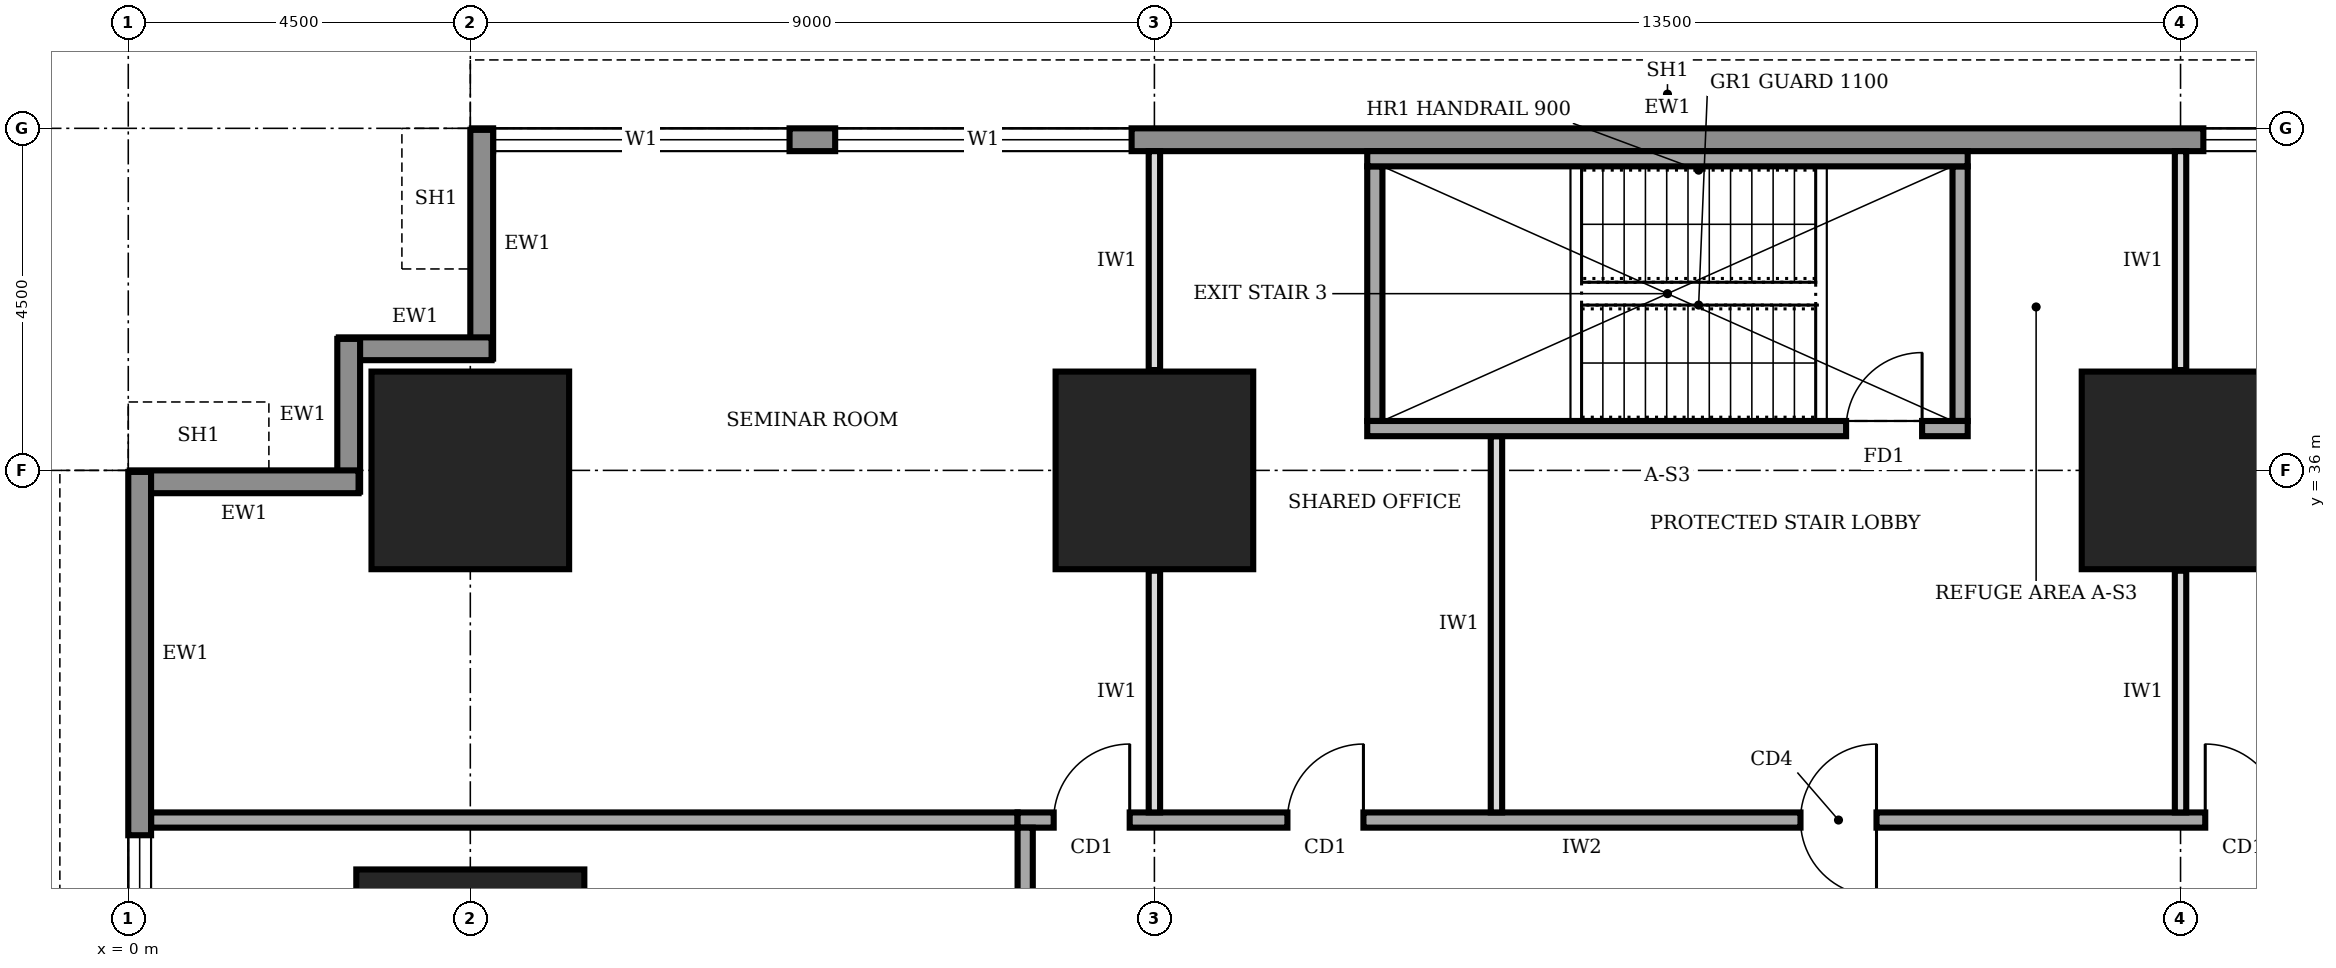
"""IFC4 building model, lengths in metres.
Left out: names, types, materials, properties, quantities, classifications, styles, units other than length and angle.
Written with IfcOpenShell. Run it as: python <this file> out.ifc"""

import sys

from ifc_helpers import new_model, si_unit, direction, frame, frame_2d, origin, origin_2d, place, context, subcontext, project, spatial, rectangle, extrude, element, fill, save


model = new_model("IFC4")
c1 = context("Model", 3, precision=1e-05, world=origin(), true_north=direction((0.0, 1.0)))
c2 = subcontext(c1, "Body", "Model", "MODEL_VIEW")
j1 = project(units=[si_unit("LENGTHUNIT", "METRE"), si_unit("PLANEANGLEUNIT", "RADIAN")], contexts=[c1])
p1 = place(None, origin())
s1 = spatial("IfcSite", under=j1, at=p1, CompositionType="ELEMENT")
p2 = place(p1, origin())
s2 = spatial("IfcBuilding", under=s1, at=p2, CompositionType="ELEMENT")
p3 = place(p2, frame((0.0, 0.0, 25.0)))
s3 = spatial("IfcBuildingStorey", under=s2, at=p3, CompositionType="ELEMENT", Elevation=25.0)
p4 = place(p3, frame((4.5, 29.25, 0.0), z_axis=(0.0, 0.0, 1.0), x_axis=(1.0, 0.0, 0.0)))
e1 = element("IfcColumn", 1, at=p4, inside=s3, PredefinedType="COLUMN", context=c2, shape_type="SweptSolid", body=[
    extrude(rectangle(XDim=3.0, YDim=3.0, at=origin_2d()), origin(), (0.0, 0.0, 1.0), 4.0),
])
for number, where, z_axis, x_axis in (
    (2, (4.5, 36.0, 0.0), (0.0, 0.0, 1.0), (1.0, 0.0, 0.0)),
    (3, (13.5, 36.0, 0.0), (0.0, 0.0, 1.0), (1.0, 0.0, 0.0)),
    (4, (27.0, 36.0, 0.0), (0.0, 0.0, 1.0), (1.0, 0.0, 0.0)),
):
    element("IfcColumn", number, at=place(p3, frame(where, z_axis=z_axis, x_axis=x_axis)), inside=s3, PredefinedType="COLUMN", context=c2, shape_type="SweptSolid", body=[
        extrude(rectangle(XDim=2.6, YDim=2.6, at=origin_2d()), origin(), (0.0, 0.0, 1.0), 4.0),
    ])
p5 = place(p3, frame((35.98, 40.35, 0.0), z_axis=(0.0, 0.0, 1.0), x_axis=(-1.0, 0.0, 0.0)))
e5 = element("IfcWall", 5, at=p5, inside=s3, PredefinedType="STANDARD", context=c2, shape_type="SweptSolid", body=[
    extrude(rectangle(XDim=31.46, YDim=0.3, at=frame_2d((15.73, 0.0))), origin(), (0.0, 0.0, 1.0), 3.75),
])
p6 = place(p5, frame((27.28, 0.0, 0.9)))
e6 = element("IfcOpeningElement", 6, at=p6, cuts=e5, PredefinedType="OPENING", context=c2, shape_type="SweptSolid", body=[
    extrude(rectangle(XDim=3.9, YDim=2.2, at=frame_2d((1.95, 1.1))), frame((0.0, 0.16, 0.0), z_axis=(0.0, -1.0, 0.0), x_axis=(1.0, 0.0, 0.0)), (0.0, 0.0, 1.0), 0.32),
])
p7 = place(p5, frame((22.78, 0.0, 0.9)))
e7 = element("IfcOpeningElement", 7, at=p7, cuts=e5, PredefinedType="OPENING", context=c2, shape_type="SweptSolid", body=[
    extrude(rectangle(XDim=3.9, YDim=2.2, at=frame_2d((1.95, 1.1))), frame((0.0, 0.16, 0.0), z_axis=(0.0, -1.0, 0.0), x_axis=(1.0, 0.0, 0.0)), (0.0, 0.0, 1.0), 0.32),
])
p8 = place(p5, frame((4.78, 0.0, 0.9)))
e8 = element("IfcOpeningElement", 8, at=p8, cuts=e5, PredefinedType="OPENING", context=c2, shape_type="SweptSolid", body=[
    extrude(rectangle(XDim=3.9, YDim=2.2, at=frame_2d((1.95, 1.1))), frame((0.0, 0.16, 0.0), z_axis=(0.0, -1.0, 0.0), x_axis=(1.0, 0.0, 0.0)), (0.0, 0.0, 1.0), 0.32),
])
p9 = place(p3, frame((4.65, 40.48, 0.0), z_axis=(0.0, 0.0, 1.0), x_axis=(0.0, -1.0, 0.0)))
e9 = element("IfcWall", 9, at=p9, inside=s3, PredefinedType="STANDARD", context=c2, shape_type="SweptSolid", body=[
    extrude(rectangle(XDim=3.01, YDim=0.3, at=frame_2d((1.505, 0.0))), origin(), (0.0, 0.0, 1.0), 2.85),
])
for number, where, z_axis, x_axis in (
    (10, (4.78, 37.6, 0.0), (0.0, 0.0, 1.0), (-1.0, 0.0, 0.0)),
    (11, (2.9, 37.73, 0.0), (0.0, 0.0, 1.0), (0.0, -1.0, 0.0)),
):
    element("IfcWall", number, at=place(p3, frame(where, z_axis=z_axis, x_axis=x_axis)), inside=s3, PredefinedType="STANDARD", context=c2, shape_type="SweptSolid", body=[
        extrude(rectangle(XDim=2.01, YDim=0.3, at=frame_2d((1.005, 0.0))), origin(), (0.0, 0.0, 1.0), 3.75),
    ])
p10 = place(p3, frame((3.03, 35.85, 0.0), z_axis=(0.0, 0.0, 1.0), x_axis=(-1.0, 0.0, 0.0)))
e12 = element("IfcWall", 12, at=p10, inside=s3, PredefinedType="STANDARD", context=c2, shape_type="SweptSolid", body=[
    extrude(rectangle(XDim=3.01, YDim=0.3, at=frame_2d((1.505, 0.0))), origin(), (0.0, 0.0, 1.0), 2.85),
])
p11 = place(p3, frame((0.15, 35.98, 0.0), z_axis=(0.0, 0.0, 1.0), x_axis=(0.0, -1.0, 0.0)))
e13 = element("IfcWall", 13, at=p11, inside=s3, PredefinedType="STANDARD", context=c2, shape_type="SweptSolid", body=[
    extrude(rectangle(XDim=31.46, YDim=0.3, at=frame_2d((15.73, 0.0))), origin(), (0.0, 0.0, 1.0), 3.75),
])
p12 = place(p11, frame((27.28, 0.0, 0.9)))
e14 = element("IfcOpeningElement", 14, at=p12, cuts=e13, PredefinedType="OPENING", context=c2, shape_type="SweptSolid", body=[
    extrude(rectangle(XDim=3.9, YDim=2.2, at=frame_2d((1.95, 1.1))), frame((0.0, 0.16, 0.0), z_axis=(0.0, -1.0, 0.0), x_axis=(1.0, 0.0, 0.0)), (0.0, 0.0, 1.0), 0.32),
])
p13 = place(p11, frame((22.78, 0.0, 0.9)))
e15 = element("IfcOpeningElement", 15, at=p13, cuts=e13, PredefinedType="OPENING", context=c2, shape_type="SweptSolid", body=[
    extrude(rectangle(XDim=3.9, YDim=2.2, at=frame_2d((1.95, 1.1))), frame((0.0, 0.16, 0.0), z_axis=(0.0, -1.0, 0.0), x_axis=(1.0, 0.0, 0.0)), (0.0, 0.0, 1.0), 0.32),
])
p14 = place(p11, frame((18.28, 0.0, 0.9)))
e16 = element("IfcOpeningElement", 16, at=p14, cuts=e13, PredefinedType="OPENING", context=c2, shape_type="SweptSolid", body=[
    extrude(rectangle(XDim=3.9, YDim=2.2, at=frame_2d((1.95, 1.1))), frame((0.0, 0.16, 0.0), z_axis=(0.0, -1.0, 0.0), x_axis=(1.0, 0.0, 0.0)), (0.0, 0.0, 1.0), 0.32),
])
p15 = place(p11, frame((13.78, 0.0, 0.9)))
e17 = element("IfcOpeningElement", 17, at=p15, cuts=e13, PredefinedType="OPENING", context=c2, shape_type="SweptSolid", body=[
    extrude(rectangle(XDim=3.9, YDim=2.2, at=frame_2d((1.95, 1.1))), frame((0.0, 0.16, 0.0), z_axis=(0.0, -1.0, 0.0), x_axis=(1.0, 0.0, 0.0)), (0.0, 0.0, 1.0), 0.32),
])
p16 = place(p11, frame((9.28, 0.0, 0.9)))
e18 = element("IfcOpeningElement", 18, at=p16, cuts=e13, PredefinedType="OPENING", context=c2, shape_type="SweptSolid", body=[
    extrude(rectangle(XDim=3.9, YDim=2.2, at=frame_2d((1.95, 1.1))), frame((0.0, 0.16, 0.0), z_axis=(0.0, -1.0, 0.0), x_axis=(1.0, 0.0, 0.0)), (0.0, 0.0, 1.0), 0.32),
])
p17 = place(p11, frame((4.78, 0.0, 0.9)))
e19 = element("IfcOpeningElement", 19, at=p17, cuts=e13, PredefinedType="OPENING", context=c2, shape_type="SweptSolid", body=[
    extrude(rectangle(XDim=3.9, YDim=2.2, at=frame_2d((1.95, 1.1))), frame((0.0, 0.16, 0.0), z_axis=(0.0, -1.0, 0.0), x_axis=(1.0, 0.0, 0.0)), (0.0, 0.0, 1.0), 0.32),
])
p18 = place(p3, frame((28.6, 31.4, 0.0), z_axis=(0.0, 0.0, 1.0), x_axis=(-1.0, 0.0, 0.0)))
e20 = element("IfcWall", 20, at=p18, inside=s3, PredefinedType="SOLIDWALL", context=c2, shape_type="SweptSolid", body=[
    extrude(rectangle(XDim=16.9, YDim=0.2, at=frame_2d((8.45, 0.0))), origin(), (0.0, 0.0, 1.0), 3.75),
])
p19 = place(p18, frame((15.425, 0.0, 0.0)))
e21 = element("IfcOpeningElement", 21, at=p19, cuts=e20, PredefinedType="OPENING", context=c2, shape_type="SweptSolid", body=[
    extrude(rectangle(XDim=1.0, YDim=2.1, at=frame_2d((0.5, 1.05))), frame((0.0, 0.11, 0.0), z_axis=(0.0, -1.0, 0.0), x_axis=(1.0, 0.0, 0.0)), (0.0, 0.0, 1.0), 0.22),
])
p20 = place(p18, frame((12.35, 0.0, 0.0)))
e22 = element("IfcOpeningElement", 22, at=p20, cuts=e20, PredefinedType="OPENING", context=c2, shape_type="SweptSolid", body=[
    extrude(rectangle(XDim=1.0, YDim=2.1, at=frame_2d((0.5, 1.05))), frame((0.0, 0.11, 0.0), z_axis=(0.0, -1.0, 0.0), x_axis=(1.0, 0.0, 0.0)), (0.0, 0.0, 1.0), 0.22),
])
p21 = place(p18, frame((5.6, 0.0, 0.0)))
e23 = element("IfcOpeningElement", 23, at=p21, cuts=e20, PredefinedType="OPENING", context=c2, shape_type="SweptSolid", body=[
    extrude(rectangle(XDim=1.0, YDim=2.1, at=frame_2d((0.5, 1.05))), frame((0.0, 0.11, 0.0), z_axis=(0.0, -1.0, 0.0), x_axis=(1.0, 0.0, 0.0)), (0.0, 0.0, 1.0), 0.22),
])
p22 = place(p18, frame((0.275, 0.0, 0.0)))
e24 = element("IfcOpeningElement", 24, at=p22, cuts=e20, PredefinedType="OPENING", context=c2, shape_type="SweptSolid", body=[
    extrude(rectangle(XDim=1.0, YDim=2.1, at=frame_2d((0.5, 1.05))), frame((0.0, 0.11, 0.0), z_axis=(0.0, -1.0, 0.0), x_axis=(1.0, 0.0, 0.0)), (0.0, 0.0, 1.0), 0.22),
])
p23 = place(p3, frame((11.8, 31.3, 0.0), z_axis=(0.0, 0.0, 1.0), x_axis=(0.0, -1.0, 0.0)))
e25 = element("IfcWall", 25, at=p23, inside=s3, PredefinedType="SOLIDWALL", context=c2, shape_type="SweptSolid", body=[
    extrude(rectangle(XDim=23.8, YDim=0.2, at=frame_2d((11.9, 0.0))), origin(), (0.0, 0.0, 1.0), 3.75),
])
p24 = place(p23, frame((20.3, 0.0, 0.0)))
e26 = element("IfcOpeningElement", 26, at=p24, cuts=e25, PredefinedType="OPENING", context=c2, shape_type="SweptSolid", body=[
    extrude(rectangle(XDim=1.0, YDim=2.1, at=frame_2d((0.5, 1.05))), frame((0.0, 0.11, 0.0), z_axis=(0.0, -1.0, 0.0), x_axis=(1.0, 0.0, 0.0)), (0.0, 0.0, 1.0), 0.22),
])
p25 = place(p23, frame((16.2, 0.0, 0.0)))
e27 = element("IfcOpeningElement", 27, at=p25, cuts=e25, PredefinedType="OPENING", context=c2, shape_type="SweptSolid", body=[
    extrude(rectangle(XDim=1.0, YDim=2.1, at=frame_2d((0.5, 1.05))), frame((0.0, 0.11, 0.0), z_axis=(0.0, -1.0, 0.0), x_axis=(1.0, 0.0, 0.0)), (0.0, 0.0, 1.0), 0.22),
])
p26 = place(p23, frame((13.2, 0.0, 0.0)))
e28 = element("IfcOpeningElement", 28, at=p26, cuts=e25, PredefinedType="OPENING", context=c2, shape_type="SweptSolid", body=[
    extrude(rectangle(XDim=0.9, YDim=2.1, at=frame_2d((0.45, 1.05))), frame((0.0, 0.11, 0.0), z_axis=(0.0, -1.0, 0.0), x_axis=(1.0, 0.0, 0.0)), (0.0, 0.0, 1.0), 0.22),
])
p27 = place(p23, frame((10.15, 0.0, 0.0)))
e29 = element("IfcOpeningElement", 29, at=p27, cuts=e25, PredefinedType="OPENING", context=c2, shape_type="SweptSolid", body=[
    extrude(rectangle(XDim=0.9, YDim=2.1, at=frame_2d((0.45, 1.05))), frame((0.0, 0.11, 0.0), z_axis=(0.0, -1.0, 0.0), x_axis=(1.0, 0.0, 0.0)), (0.0, 0.0, 1.0), 0.22),
])
p28 = place(p23, frame((5.45, 0.0, 0.0)))
e30 = element("IfcOpeningElement", 30, at=p28, cuts=e25, PredefinedType="OPENING", context=c2, shape_type="SweptSolid", body=[
    extrude(rectangle(XDim=0.9, YDim=2.1, at=frame_2d((0.45, 1.05))), frame((0.0, 0.11, 0.0), z_axis=(0.0, -1.0, 0.0), x_axis=(1.0, 0.0, 0.0)), (0.0, 0.0, 1.0), 0.22),
])
p29 = place(p23, frame((8.0, 0.0, 0.0)))
e31 = element("IfcOpeningElement", 31, at=p29, cuts=e25, PredefinedType="OPENING", context=c2, shape_type="SweptSolid", body=[
    extrude(rectangle(XDim=1.0, YDim=2.1, at=frame_2d((0.5, 1.05))), frame((0.0, 0.11, 0.0), z_axis=(0.0, -1.0, 0.0), x_axis=(1.0, 0.0, 0.0)), (0.0, 0.0, 1.0), 0.22),
])
p30 = place(p23, frame((1.55, 0.0, 0.0)))
e32 = element("IfcOpeningElement", 32, at=p30, cuts=e25, PredefinedType="OPENING", context=c2, shape_type="SweptSolid", body=[
    extrude(rectangle(XDim=1.0, YDim=2.1, at=frame_2d((0.5, 1.05))), frame((0.0, 0.11, 0.0), z_axis=(0.0, -1.0, 0.0), x_axis=(1.0, 0.0, 0.0)), (0.0, 0.0, 1.0), 0.22),
])
p31 = place(p3, frame((0.3, 31.4, 0.0), z_axis=(0.0, 0.0, 1.0), x_axis=(1.0, 0.0, 0.0)))
e33 = element("IfcWall", 33, at=p31, inside=s3, PredefinedType="SOLIDWALL", context=c2, shape_type="SweptSolid", body=[
    extrude(rectangle(XDim=11.4, YDim=0.2, at=frame_2d((5.7, 0.0))), origin(), (0.0, 0.0, 1.0), 3.75),
])
p32 = place(p3, frame((13.5, 31.5, 0.0), z_axis=(0.0, 0.0, 1.0), x_axis=(0.0, 1.0, 0.0)))
e34 = element("IfcWall", 34, at=p32, inside=s3, PredefinedType="PARTITIONING", context=c2, shape_type="SweptSolid", body=[
    extrude(rectangle(XDim=3.18, YDim=0.15, at=frame_2d((1.59, 0.0))), origin(), (0.0, 0.0, 1.0), 2.85),
])
p33 = place(p3, frame((13.5, 37.32, 0.0), z_axis=(0.0, 0.0, 1.0), x_axis=(0.0, 1.0, 0.0)))
e35 = element("IfcWall", 35, at=p33, inside=s3, PredefinedType="PARTITIONING", context=c2, shape_type="SweptSolid", body=[
    extrude(rectangle(XDim=2.88, YDim=0.15, at=frame_2d((1.44, 0.0))), origin(), (0.0, 0.0, 1.0), 2.85),
])
p34 = place(p3, frame((18.0, 31.5, 0.0), z_axis=(0.0, 0.0, 1.0), x_axis=(0.0, 1.0, 0.0)))
e36 = element("IfcWall", 36, at=p34, inside=s3, PredefinedType="PARTITIONING", context=c2, shape_type="SweptSolid", body=[
    extrude(rectangle(XDim=4.95, YDim=0.15, at=frame_2d((2.475, 0.0))), origin(), (0.0, 0.0, 1.0), 3.75),
])
p35 = place(p3, frame((27.0, 31.5, 0.0), z_axis=(0.0, 0.0, 1.0), x_axis=(0.0, 1.0, 0.0)))
e37 = element("IfcWall", 37, at=p35, inside=s3, PredefinedType="PARTITIONING", context=c2, shape_type="SweptSolid", body=[
    extrude(rectangle(XDim=3.18, YDim=0.15, at=frame_2d((1.59, 0.0))), origin(), (0.0, 0.0, 1.0), 2.85),
])
p36 = place(p3, frame((27.0, 37.32, 0.0), z_axis=(0.0, 0.0, 1.0), x_axis=(0.0, 1.0, 0.0)))
e38 = element("IfcWall", 38, at=p36, inside=s3, PredefinedType="PARTITIONING", context=c2, shape_type="SweptSolid", body=[
    extrude(rectangle(XDim=2.88, YDim=0.15, at=frame_2d((1.44, 0.0))), origin(), (0.0, 0.0, 1.0), 2.85),
])
p37 = place(p3, frame((16.3, 36.55, 0.0), z_axis=(0.0, 0.0, 1.0), x_axis=(1.0, 0.0, 0.0)))
e39 = element("IfcWall", 39, at=p37, inside=s3, PredefinedType="SOLIDWALL", context=c2, shape_type="SweptSolid", body=[
    extrude(rectangle(XDim=7.9, YDim=0.2, at=frame_2d((3.95, 0.0))), origin(), (0.0, 0.0, 1.0), 3.75),
])
p38 = place(p37, frame((6.3, 0.0, 0.0)))
e40 = element("IfcOpeningElement", 40, at=p38, cuts=e39, PredefinedType="OPENING", context=c2, shape_type="SweptSolid", body=[
    extrude(rectangle(XDim=1.0, YDim=2.1, at=frame_2d((0.5, 1.05))), frame((0.0, 0.11, 0.0), z_axis=(0.0, -1.0, 0.0), x_axis=(1.0, 0.0, 0.0)), (0.0, 0.0, 1.0), 0.22),
])
p39 = place(p3, frame((16.3, 40.1, 0.0), z_axis=(0.0, 0.0, 1.0), x_axis=(1.0, 0.0, 0.0)))
e41 = element("IfcWall", 41, at=p39, inside=s3, PredefinedType="SOLIDWALL", context=c2, shape_type="SweptSolid", body=[
    extrude(rectangle(XDim=7.9, YDim=0.2, at=frame_2d((3.95, 0.0))), origin(), (0.0, 0.0, 1.0), 3.75),
])
for number, where, z_axis, x_axis in (
    (42, (16.4, 36.65, 0.0), (0.0, 0.0, 1.0), (0.0, 1.0, 0.0)),
    (43, (24.1, 36.65, 0.0), (0.0, 0.0, 1.0), (0.0, 1.0, 0.0)),
):
    element("IfcWall", number, at=place(p3, frame(where, z_axis=z_axis, x_axis=x_axis)), inside=s3, PredefinedType="SOLIDWALL", context=c2, shape_type="SweptSolid", body=[
        extrude(rectangle(XDim=3.35, YDim=0.2, at=frame_2d((1.675, 0.0))), origin(), (0.0, 0.0, 1.0), 3.75),
    ])
p40 = place(p6, origin())
e44 = element("IfcWindow", 44, at=p40, inside=s3, PartitioningType="SINGLE_PANEL", PredefinedType="WINDOW", context=c2, shape_type="SweptSolid", body=[
    extrude(rectangle(XDim=3.9, YDim=2.2, at=frame_2d((1.95, 1.1))), frame((0.0, 0.03, 0.0), z_axis=(0.0, -1.0, 0.0), x_axis=(1.0, 0.0, 0.0)), (0.0, 0.0, 1.0), 0.06),
])
fill(e6, e44)
p41 = place(p7, origin())
e45 = element("IfcWindow", 45, at=p41, inside=s3, PartitioningType="SINGLE_PANEL", PredefinedType="WINDOW", context=c2, shape_type="SweptSolid", body=[
    extrude(rectangle(XDim=3.9, YDim=2.2, at=frame_2d((1.95, 1.1))), frame((0.0, 0.03, 0.0), z_axis=(0.0, -1.0, 0.0), x_axis=(1.0, 0.0, 0.0)), (0.0, 0.0, 1.0), 0.06),
])
fill(e7, e45)
p42 = place(p8, origin())
e46 = element("IfcWindow", 46, at=p42, inside=s3, PartitioningType="SINGLE_PANEL", PredefinedType="WINDOW", context=c2, shape_type="SweptSolid", body=[
    extrude(rectangle(XDim=3.9, YDim=2.2, at=frame_2d((1.95, 1.1))), frame((0.0, 0.03, 0.0), z_axis=(0.0, -1.0, 0.0), x_axis=(1.0, 0.0, 0.0)), (0.0, 0.0, 1.0), 0.06),
])
fill(e8, e46)
p43 = place(p17, origin())
e47 = element("IfcWindow", 47, at=p43, inside=s3, PartitioningType="SINGLE_PANEL", PredefinedType="WINDOW", context=c2, shape_type="SweptSolid", body=[
    extrude(rectangle(XDim=3.9, YDim=2.2, at=frame_2d((1.95, 1.1))), frame((0.0, 0.03, 0.0), z_axis=(0.0, -1.0, 0.0), x_axis=(1.0, 0.0, 0.0)), (0.0, 0.0, 1.0), 0.06),
])
fill(e19, e47)
p44 = place(p19, frame((1.0, 0.0, 0.0), z_axis=(0.0, 0.0, 1.0), x_axis=(-1.0, 0.0, 0.0)))
e48 = element("IfcDoor", 48, at=p44, inside=s3, OperationType="SINGLE_SWING_RIGHT", PredefinedType="DOOR", context=c2, shape_type="SweptSolid", body=[
    extrude(rectangle(XDim=1.0, YDim=2.1, at=frame_2d((0.5, 1.05))), frame((0.0, 0.025, 0.0), z_axis=(0.0, -1.0, 0.0), x_axis=(1.0, 0.0, 0.0)), (0.0, 0.0, 1.0), 0.05),
])
fill(e21, e48)
p45 = place(p20, frame((1.0, 0.0, 0.0), z_axis=(0.0, 0.0, 1.0), x_axis=(-1.0, 0.0, 0.0)))
e49 = element("IfcDoor", 49, at=p45, inside=s3, OperationType="SINGLE_SWING_RIGHT", PredefinedType="DOOR", context=c2, shape_type="SweptSolid", body=[
    extrude(rectangle(XDim=1.0, YDim=2.1, at=frame_2d((0.5, 1.05))), frame((0.0, 0.025, 0.0), z_axis=(0.0, -1.0, 0.0), x_axis=(1.0, 0.0, 0.0)), (0.0, 0.0, 1.0), 0.05),
])
fill(e22, e49)
p46 = place(p21, origin())
e50 = element("IfcDoor", 50, at=p46, inside=s3, OperationType="DOUBLE_SWING_LEFT", PredefinedType="DOOR", context=c2, shape_type="SweptSolid", body=[
    extrude(rectangle(XDim=1.0, YDim=2.1, at=frame_2d((0.5, 1.05))), frame((0.0, 0.025, 0.0), z_axis=(0.0, -1.0, 0.0), x_axis=(1.0, 0.0, 0.0)), (0.0, 0.0, 1.0), 0.05),
])
fill(e23, e50)
p47 = place(p22, frame((1.0, 0.0, 0.0), z_axis=(0.0, 0.0, 1.0), x_axis=(-1.0, 0.0, 0.0)))
e51 = element("IfcDoor", 51, at=p47, inside=s3, OperationType="SINGLE_SWING_LEFT", PredefinedType="DOOR", context=c2, shape_type="SweptSolid", body=[
    extrude(rectangle(XDim=1.0, YDim=2.1, at=frame_2d((0.5, 1.05))), frame((0.0, 0.025, 0.0), z_axis=(0.0, -1.0, 0.0), x_axis=(1.0, 0.0, 0.0)), (0.0, 0.0, 1.0), 0.05),
])
fill(e24, e51)
p48 = place(p38, origin())
e52 = element("IfcDoor", 52, at=p48, inside=s3, OperationType="SINGLE_SWING_RIGHT", PredefinedType="DOOR", context=c2, shape_type="SweptSolid", body=[
    extrude(rectangle(XDim=1.0, YDim=2.1, at=frame_2d((0.5, 1.05))), frame((0.0, 0.025, 0.0), z_axis=(0.0, -1.0, 0.0), x_axis=(1.0, 0.0, 0.0)), (0.0, 0.0, 1.0), 0.05),
])
fill(e40, e52)
save(model, sys.argv[1])
